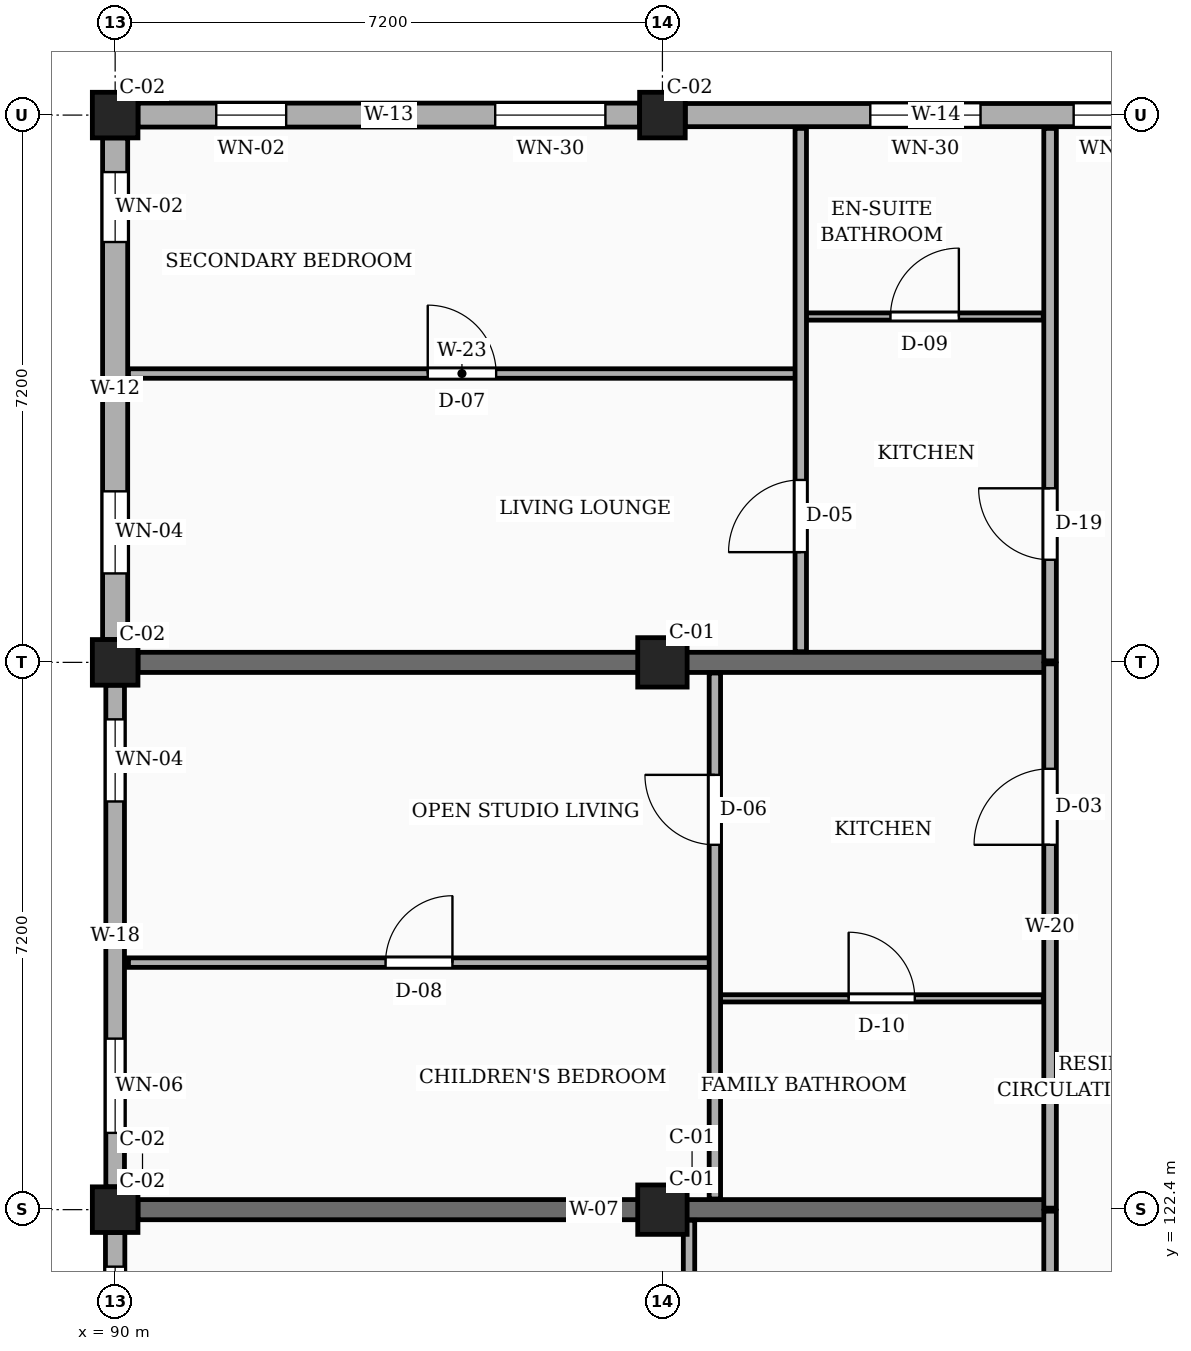
"""IFC4 building model, lengths in metres.
Left out: names, types, materials, properties, quantities, classifications, styles, units other than length and angle.
Written with IfcOpenShell. Run it as: python <this file> out.ifc"""

import sys

from ifc_helpers import new_model, si_unit, direction, frame, frame_2d, origin, origin_2d, place, context, subcontext, project, spatial, rectangle, extrude, element, fill, save


model = new_model("IFC4")
c1 = context("Model", 3, precision=1e-05, world=origin(), true_north=direction((0.0, 1.0)))
c2 = subcontext(c1, "Body", "Model", "MODEL_VIEW")
j1 = project(units=[si_unit("LENGTHUNIT", "METRE"), si_unit("PLANEANGLEUNIT", "RADIAN")], contexts=[c1])
p1 = place(None, origin())
s1 = spatial("IfcSite", under=j1, at=p1, CompositionType="ELEMENT")
p2 = place(p1, origin())
s2 = spatial("IfcBuilding", under=s1, at=p2, CompositionType="ELEMENT")
p3 = place(p2, frame((0.0, 0.0, 4.5)))
s3 = spatial("IfcBuildingStorey", under=s2, at=p3, CompositionType="ELEMENT", Elevation=4.5)
for number, where, z_axis, x_axis in (
    (1, (90.0, 122.4, 0.0), (0.0, 0.0, 1.0), (1.0, 0.0, 0.0)),
    (2, (90.0, 129.6, 0.0), (0.0, 0.0, 1.0), (1.0, 0.0, 0.0)),
    (3, (90.0, 136.8, 0.0), (0.0, 0.0, 1.0), (1.0, 0.0, 0.0)),
):
    element("IfcColumn", number, at=place(p3, frame(where, z_axis=z_axis, x_axis=x_axis)), inside=s3, PredefinedType="COLUMN", context=c2, shape_type="SweptSolid", body=[
        extrude(rectangle(XDim=0.6, YDim=0.6, at=origin_2d()), origin(), (0.0, 0.0, 1.0), 3.15),
    ])
for number, where, z_axis, x_axis in (
    (4, (97.2, 122.4, 0.0), (0.0, 0.0, 1.0), (1.0, 0.0, 0.0)),
    (5, (97.2, 129.6, 0.0), (0.0, 0.0, 1.0), (1.0, 0.0, 0.0)),
):
    element("IfcColumn", number, at=place(p3, frame(where, z_axis=z_axis, x_axis=x_axis)), inside=s3, PredefinedType="COLUMN", context=c2, shape_type="SweptSolid", body=[
        extrude(rectangle(XDim=0.65, YDim=0.65, at=origin_2d()), origin(), (0.0, 0.0, 1.0), 3.15),
    ])
p4 = place(p3, frame((97.2, 136.8, 0.0), z_axis=(0.0, 0.0, 1.0), x_axis=(1.0, 0.0, 0.0)))
e6 = element("IfcColumn", 6, at=p4, inside=s3, PredefinedType="COLUMN", context=c2, shape_type="SweptSolid", body=[
    extrude(rectangle(XDim=0.6, YDim=0.6, at=origin_2d()), origin(), (0.0, 0.0, 1.0), 3.15),
])
for number, where, z_axis, x_axis in (
    (7, (90.3, 122.4, 0.0), (0.0, 0.0, 1.0), (1.0, 0.0, 0.0)),
    (8, (90.3, 129.6, 0.0), (0.0, 0.0, 1.0), (1.0, 0.0, 0.0)),
):
    element("IfcWall", number, at=place(p3, frame(where, z_axis=z_axis, x_axis=x_axis)), inside=s3, PredefinedType="SOLIDWALL", context=c2, shape_type="SweptSolid", body=[
        extrude(rectangle(XDim=12.0, YDim=0.265, at=frame_2d((6.0, 0.0))), origin(), (0.0, 0.0, 1.0), 2.19),
    ])
p5 = place(p3, frame((104.1, 136.8, 0.0), z_axis=(0.0, 0.0, 1.0), x_axis=(-1.0, 0.0, 0.0)))
e9 = element("IfcWall", 9, at=p5, inside=s3, PredefinedType="SOLIDWALL", context=c2, shape_type="SweptSolid", body=[
    extrude(rectangle(XDim=6.6, YDim=0.305, at=frame_2d((3.3, 0.0))), origin(), (0.0, 0.0, 1.0), 2.46),
])
p6 = place(p5, frame((0.45, 0.0, 0.78)))
e10 = element("IfcOpeningElement", 10, at=p6, cuts=e9, PredefinedType="OPENING", context=c2, shape_type="SweptSolid", body=[
    extrude(rectangle(XDim=1.04, YDim=1.26, at=frame_2d((0.52, 0.63))), frame((0.0, 0.163, 0.0), z_axis=(0.0, -1.0, 0.0), x_axis=(1.0, 0.0, 0.0)), (0.0, 0.0, 1.0), 0.325),
])
p7 = place(p5, frame((2.715, 0.0, 0.78)))
e11 = element("IfcOpeningElement", 11, at=p7, cuts=e9, PredefinedType="OPENING", context=c2, shape_type="SweptSolid", body=[
    extrude(rectangle(XDim=1.45, YDim=1.44, at=frame_2d((0.725, 0.72))), frame((0.0, 0.163, 0.0), z_axis=(0.0, -1.0, 0.0), x_axis=(1.0, 0.0, 0.0)), (0.0, 0.0, 1.0), 0.325),
])
p8 = place(p3, frame((96.9, 136.8, 0.0), z_axis=(0.0, 0.0, 1.0), x_axis=(-1.0, 0.0, 0.0)))
e12 = element("IfcWall", 12, at=p8, inside=s3, PredefinedType="SOLIDWALL", context=c2, shape_type="SweptSolid", body=[
    extrude(rectangle(XDim=6.6, YDim=0.315, at=frame_2d((3.3, 0.0))), origin(), (0.0, 0.0, 1.0), 2.46),
])
p9 = place(p8, frame((0.45, 0.0, 0.78)))
e13 = element("IfcOpeningElement", 13, at=p9, cuts=e12, PredefinedType="OPENING", context=c2, shape_type="SweptSolid", body=[
    extrude(rectangle(XDim=1.45, YDim=1.44, at=frame_2d((0.725, 0.72))), frame((0.0, 0.167, 0.0), z_axis=(0.0, -1.0, 0.0), x_axis=(1.0, 0.0, 0.0)), (0.0, 0.0, 1.0), 0.335),
])
p10 = place(p8, frame((4.65, 0.0, 0.78)))
e14 = element("IfcOpeningElement", 14, at=p10, cuts=e12, PredefinedType="OPENING", context=c2, shape_type="SweptSolid", body=[
    extrude(rectangle(XDim=0.92, YDim=1.15, at=frame_2d((0.46, 0.575))), frame((0.0, 0.167, 0.0), z_axis=(0.0, -1.0, 0.0), x_axis=(1.0, 0.0, 0.0)), (0.0, 0.0, 1.0), 0.335),
])
p11 = place(p3, frame((90.0, 136.5, 0.0), z_axis=(0.0, 0.0, 1.0), x_axis=(0.0, -1.0, 0.0)))
e15 = element("IfcWall", 15, at=p11, inside=s3, PredefinedType="SOLIDWALL", context=c2, shape_type="SweptSolid", body=[
    extrude(rectangle(XDim=6.6, YDim=0.33, at=frame_2d((3.3, 0.0))), origin(), (0.0, 0.0, 1.0), 2.46),
])
p12 = place(p11, frame((0.45, 0.0, 0.78)))
e16 = element("IfcOpeningElement", 16, at=p12, cuts=e15, PredefinedType="OPENING", context=c2, shape_type="SweptSolid", body=[
    extrude(rectangle(XDim=0.92, YDim=1.15, at=frame_2d((0.46, 0.575))), frame((0.0, 0.175, 0.0), z_axis=(0.0, -1.0, 0.0), x_axis=(1.0, 0.0, 0.0)), (0.0, 0.0, 1.0), 0.35),
])
p13 = place(p11, frame((4.65, 0.0, 0.78)))
e17 = element("IfcOpeningElement", 17, at=p13, cuts=e15, PredefinedType="OPENING", context=c2, shape_type="SweptSolid", body=[
    extrude(rectangle(XDim=1.08, YDim=1.15, at=frame_2d((0.54, 0.575))), frame((0.0, 0.175, 0.0), z_axis=(0.0, -1.0, 0.0), x_axis=(1.0, 0.0, 0.0)), (0.0, 0.0, 1.0), 0.35),
])
p14 = place(p3, frame((90.0, 129.3, 0.0), z_axis=(0.0, 0.0, 1.0), x_axis=(0.0, -1.0, 0.0)))
e18 = element("IfcWall", 18, at=p14, inside=s3, PredefinedType="SOLIDWALL", context=c2, shape_type="SweptSolid", body=[
    extrude(rectangle(XDim=6.6, YDim=0.245, at=frame_2d((3.3, 0.0))), origin(), (0.0, 0.0, 1.0), 2.46),
])
p15 = place(p14, frame((0.45, 0.0, 0.78)))
e19 = element("IfcOpeningElement", 19, at=p15, cuts=e18, PredefinedType="OPENING", context=c2, shape_type="SweptSolid", body=[
    extrude(rectangle(XDim=1.08, YDim=1.15, at=frame_2d((0.54, 0.575))), frame((0.0, 0.133, 0.0), z_axis=(0.0, -1.0, 0.0), x_axis=(1.0, 0.0, 0.0)), (0.0, 0.0, 1.0), 0.265),
])
p16 = place(p14, frame((4.65, 0.0, 0.78)))
e20 = element("IfcOpeningElement", 20, at=p16, cuts=e18, PredefinedType="OPENING", context=c2, shape_type="SweptSolid", body=[
    extrude(rectangle(XDim=1.24, YDim=1.15, at=frame_2d((0.62, 0.575))), frame((0.0, 0.133, 0.0), z_axis=(0.0, -1.0, 0.0), x_axis=(1.0, 0.0, 0.0)), (0.0, 0.0, 1.0), 0.265),
])
p17 = place(p3, frame((90.0, 122.1, 0.0), z_axis=(0.0, 0.0, 1.0), x_axis=(0.0, -1.0, 0.0)))
e21 = element("IfcWall", 21, at=p17, inside=s3, PredefinedType="SOLIDWALL", context=c2, shape_type="SweptSolid", body=[
    extrude(rectangle(XDim=6.6, YDim=0.255, at=frame_2d((3.3, 0.0))), origin(), (0.0, 0.0, 1.0), 2.46),
])
p18 = place(p17, frame((0.45, 0.0, 0.78)))
e22 = element("IfcOpeningElement", 22, at=p18, cuts=e21, PredefinedType="OPENING", context=c2, shape_type="SweptSolid", body=[
    extrude(rectangle(XDim=1.24, YDim=1.15, at=frame_2d((0.62, 0.575))), frame((0.0, 0.137, 0.0), z_axis=(0.0, -1.0, 0.0), x_axis=(1.0, 0.0, 0.0)), (0.0, 0.0, 1.0), 0.275),
])
p19 = place(p17, frame((4.65, 0.0, 0.78)))
e23 = element("IfcOpeningElement", 23, at=p19, cuts=e21, PredefinedType="OPENING", context=c2, shape_type="SweptSolid", body=[
    extrude(rectangle(XDim=1.4, YDim=1.15, at=frame_2d((0.7, 0.575))), frame((0.0, 0.137, 0.0), z_axis=(0.0, -1.0, 0.0), x_axis=(1.0, 0.0, 0.0)), (0.0, 0.0, 1.0), 0.275),
])
p20 = place(p3, frame((102.3, 115.22, 0.0), z_axis=(0.0, 0.0, 1.0), x_axis=(0.0, 1.0, 0.0)))
e24 = element("IfcWall", 24, at=p20, inside=s3, PredefinedType="PARTITIONING", context=c2, shape_type="SweptSolid", body=[
    extrude(rectangle(XDim=7.16, YDim=0.165, at=frame_2d((3.58, 0.0))), origin(), (0.0, 0.0, 1.0), 2.325),
])
p21 = place(p20, frame((4.78, 0.0, 0.0)))
e25 = element("IfcOpeningElement", 25, at=p21, cuts=e24, PredefinedType="OPENING", context=c2, shape_type="SweptSolid", body=[
    extrude(rectangle(XDim=1.14, YDim=2.18, at=frame_2d((0.57, 1.09))), frame((0.0, 0.093, 0.0), z_axis=(0.0, -1.0, 0.0), x_axis=(1.0, 0.0, 0.0)), (0.0, 0.0, 1.0), 0.185),
])
p22 = place(p3, frame((102.3, 122.42, 0.0), z_axis=(0.0, 0.0, 1.0), x_axis=(0.0, 1.0, 0.0)))
e26 = element("IfcWall", 26, at=p22, inside=s3, PredefinedType="PARTITIONING", context=c2, shape_type="SweptSolid", body=[
    extrude(rectangle(XDim=7.16, YDim=0.165, at=frame_2d((3.58, 0.0))), origin(), (0.0, 0.0, 1.0), 2.325),
])
p23 = place(p22, frame((4.78, 0.0, 0.0)))
e27 = element("IfcOpeningElement", 27, at=p23, cuts=e26, PredefinedType="OPENING", context=c2, shape_type="SweptSolid", body=[
    extrude(rectangle(XDim=1.0, YDim=2.15, at=frame_2d((0.5, 1.075))), frame((0.0, 0.093, 0.0), z_axis=(0.0, -1.0, 0.0), x_axis=(1.0, 0.0, 0.0)), (0.0, 0.0, 1.0), 0.185),
])
p24 = place(p3, frame((102.3, 129.62, 0.0), z_axis=(0.0, 0.0, 1.0), x_axis=(0.0, 1.0, 0.0)))
e28 = element("IfcWall", 28, at=p24, inside=s3, PredefinedType="PARTITIONING", context=c2, shape_type="SweptSolid", body=[
    extrude(rectangle(XDim=7.005, YDim=0.165, at=frame_2d((3.502, 0.0))), origin(), (0.0, 0.0, 1.0), 2.325),
])
p25 = place(p24, frame((1.33, 0.0, 0.0)))
e29 = element("IfcOpeningElement", 29, at=p25, cuts=e28, PredefinedType="OPENING", context=c2, shape_type="SweptSolid", body=[
    extrude(rectangle(XDim=0.94, YDim=2.12, at=frame_2d((0.47, 1.06))), frame((0.0, 0.093, 0.0), z_axis=(0.0, -1.0, 0.0), x_axis=(1.0, 0.0, 0.0)), (0.0, 0.0, 1.0), 0.185),
])
p26 = place(p3, frame((97.55, 115.34, 0.0), z_axis=(0.0, 0.0, 1.0), x_axis=(0.0, 1.0, 0.0)))
e30 = element("IfcWall", 30, at=p26, inside=s3, PredefinedType="PARTITIONING", context=c2, shape_type="SweptSolid", body=[
    extrude(rectangle(XDim=6.92, YDim=0.15, at=frame_2d((3.46, 0.0))), origin(), (0.0, 0.0, 1.0), 2.325),
])
p27 = place(p26, frame((4.66, 0.0, 0.0)))
e31 = element("IfcOpeningElement", 31, at=p27, cuts=e30, PredefinedType="OPENING", context=c2, shape_type="SweptSolid", body=[
    extrude(rectangle(XDim=0.95, YDim=2.1, at=frame_2d((0.475, 1.05))), frame((0.0, 0.085, 0.0), z_axis=(0.0, -1.0, 0.0), x_axis=(1.0, 0.0, 0.0)), (0.0, 0.0, 1.0), 0.17),
])
p28 = place(p3, frame((90.175, 125.65, 0.0), z_axis=(0.0, 0.0, 1.0), x_axis=(1.0, 0.0, 0.0)))
e32 = element("IfcWall", 32, at=p28, inside=s3, PredefinedType="PARTITIONING", context=c2, shape_type="SweptSolid", body=[
    extrude(rectangle(XDim=7.645, YDim=0.125, at=frame_2d((3.823, 0.0))), origin(), (0.0, 0.0, 1.0), 2.325),
])
p29 = place(p28, frame((3.383, 0.0, 0.0)))
e33 = element("IfcOpeningElement", 33, at=p29, cuts=e32, PredefinedType="OPENING", context=c2, shape_type="SweptSolid", body=[
    extrude(rectangle(XDim=0.88, YDim=2.08, at=frame_2d((0.44, 1.04))), frame((0.0, 0.073, 0.0), z_axis=(0.0, -1.0, 0.0), x_axis=(1.0, 0.0, 0.0)), (0.0, 0.0, 1.0), 0.145),
])
p30 = place(p3, frame((97.96, 125.18, 0.0), z_axis=(0.0, 0.0, 1.0), x_axis=(1.0, 0.0, 0.0)))
e34 = element("IfcWall", 34, at=p30, inside=s3, PredefinedType="PARTITIONING", context=c2, shape_type="SweptSolid", body=[
    extrude(rectangle(XDim=4.25, YDim=0.095, at=frame_2d((2.125, 0.0))), origin(), (0.0, 0.0, 1.0), 2.325),
])
p31 = place(p30, frame((1.69, 0.0, 0.0)))
e35 = element("IfcOpeningElement", 35, at=p31, cuts=e34, PredefinedType="OPENING", context=c2, shape_type="SweptSolid", body=[
    extrude(rectangle(XDim=0.87, YDim=2.05, at=frame_2d((0.435, 1.025))), frame((0.0, 0.058, 0.0), z_axis=(0.0, -1.0, 0.0), x_axis=(1.0, 0.0, 0.0)), (0.0, 0.0, 1.0), 0.115),
])
p32 = place(p3, frame((97.89, 122.54, 0.0), z_axis=(0.0, 0.0, 1.0), x_axis=(0.0, 1.0, 0.0)))
e36 = element("IfcWall", 36, at=p32, inside=s3, PredefinedType="PARTITIONING", context=c2, shape_type="SweptSolid", body=[
    extrude(rectangle(XDim=6.92, YDim=0.15, at=frame_2d((3.46, 0.0))), origin(), (0.0, 0.0, 1.0), 2.325),
])
p33 = place(p32, frame((4.66, 0.0, 0.0)))
e37 = element("IfcOpeningElement", 37, at=p33, cuts=e36, PredefinedType="OPENING", context=c2, shape_type="SweptSolid", body=[
    extrude(rectangle(XDim=0.92, YDim=2.1, at=frame_2d((0.46, 1.05))), frame((0.0, 0.085, 0.0), z_axis=(0.0, -1.0, 0.0), x_axis=(1.0, 0.0, 0.0)), (0.0, 0.0, 1.0), 0.17),
])
p34 = place(p3, frame((90.175, 133.4, 0.0), z_axis=(0.0, 0.0, 1.0), x_axis=(1.0, 0.0, 0.0)))
e38 = element("IfcWall", 38, at=p34, inside=s3, PredefinedType="PARTITIONING", context=c2, shape_type="SweptSolid", body=[
    extrude(rectangle(XDim=8.775, YDim=0.125, at=frame_2d((4.387, 0.0))), origin(), (0.0, 0.0, 1.0), 2.325),
])
p35 = place(p34, frame((3.938, 0.0, 0.0)))
e39 = element("IfcOpeningElement", 39, at=p35, cuts=e38, PredefinedType="OPENING", context=c2, shape_type="SweptSolid", body=[
    extrude(rectangle(XDim=0.9, YDim=2.1, at=frame_2d((0.45, 1.05))), frame((0.0, 0.073, 0.0), z_axis=(0.0, -1.0, 0.0), x_axis=(1.0, 0.0, 0.0)), (0.0, 0.0, 1.0), 0.145),
])
p36 = place(p3, frame((99.09, 134.15, 0.0), z_axis=(0.0, 0.0, 1.0), x_axis=(1.0, 0.0, 0.0)))
e40 = element("IfcWall", 40, at=p36, inside=s3, PredefinedType="PARTITIONING", context=c2, shape_type="SweptSolid", body=[
    extrude(rectangle(XDim=3.12, YDim=0.095, at=frame_2d((1.56, 0.0))), origin(), (0.0, 0.0, 1.0), 2.325),
])
p37 = place(p36, frame((1.11, 0.0, 0.0)))
e41 = element("IfcOpeningElement", 41, at=p37, cuts=e40, PredefinedType="OPENING", context=c2, shape_type="SweptSolid", body=[
    extrude(rectangle(XDim=0.9, YDim=2.05, at=frame_2d((0.45, 1.025))), frame((0.0, 0.058, 0.0), z_axis=(0.0, -1.0, 0.0), x_axis=(1.0, 0.0, 0.0)), (0.0, 0.0, 1.0), 0.115),
])
p38 = place(p3, frame((99.02, 129.74, 0.0), z_axis=(0.0, 0.0, 1.0), x_axis=(0.0, 1.0, 0.0)))
e42 = element("IfcWall", 42, at=p38, inside=s3, PredefinedType="PARTITIONING", context=c2, shape_type="SweptSolid", body=[
    extrude(rectangle(XDim=6.885, YDim=0.15, at=frame_2d((3.442, 0.0))), origin(), (0.0, 0.0, 1.0), 2.325),
])
p39 = place(p38, frame((1.31, 0.0, 0.0)))
e43 = element("IfcOpeningElement", 43, at=p39, cuts=e42, PredefinedType="OPENING", context=c2, shape_type="SweptSolid", body=[
    extrude(rectangle(XDim=0.95, YDim=2.1, at=frame_2d((0.475, 1.05))), frame((0.0, 0.085, 0.0), z_axis=(0.0, -1.0, 0.0), x_axis=(1.0, 0.0, 0.0)), (0.0, 0.0, 1.0), 0.17),
])
p40 = place(p6, origin())
e44 = element("IfcWindow", 44, at=p40, inside=s3, PartitioningType="SINGLE_PANEL", PredefinedType="WINDOW", context=c2, shape_type="SweptSolid", body=[
    extrude(rectangle(XDim=1.04, YDim=1.26, at=frame_2d((0.52, 0.63))), frame((0.0, 0.03, 0.0), z_axis=(0.0, -1.0, 0.0), x_axis=(1.0, 0.0, 0.0)), (0.0, 0.0, 1.0), 0.06),
])
fill(e10, e44)
p41 = place(p7, origin())
e45 = element("IfcWindow", 45, at=p41, inside=s3, PartitioningType="SINGLE_PANEL", PredefinedType="WINDOW", context=c2, shape_type="SweptSolid", body=[
    extrude(rectangle(XDim=1.45, YDim=1.44, at=frame_2d((0.725, 0.72))), frame((0.0, 0.03, 0.0), z_axis=(0.0, -1.0, 0.0), x_axis=(1.0, 0.0, 0.0)), (0.0, 0.0, 1.0), 0.06),
])
fill(e11, e45)
p42 = place(p9, origin())
e46 = element("IfcWindow", 46, at=p42, inside=s3, PartitioningType="SINGLE_PANEL", PredefinedType="WINDOW", context=c2, shape_type="SweptSolid", body=[
    extrude(rectangle(XDim=1.45, YDim=1.44, at=frame_2d((0.725, 0.72))), frame((0.0, 0.03, 0.0), z_axis=(0.0, -1.0, 0.0), x_axis=(1.0, 0.0, 0.0)), (0.0, 0.0, 1.0), 0.06),
])
fill(e13, e46)
p43 = place(p10, origin())
e47 = element("IfcWindow", 47, at=p43, inside=s3, PartitioningType="SINGLE_PANEL", PredefinedType="WINDOW", context=c2, shape_type="SweptSolid", body=[
    extrude(rectangle(XDim=0.92, YDim=1.15, at=frame_2d((0.46, 0.575))), frame((0.0, 0.03, 0.0), z_axis=(0.0, -1.0, 0.0), x_axis=(1.0, 0.0, 0.0)), (0.0, 0.0, 1.0), 0.06),
])
fill(e14, e47)
p44 = place(p12, origin())
e48 = element("IfcWindow", 48, at=p44, inside=s3, PartitioningType="SINGLE_PANEL", PredefinedType="WINDOW", context=c2, shape_type="SweptSolid", body=[
    extrude(rectangle(XDim=0.92, YDim=1.15, at=frame_2d((0.46, 0.575))), frame((0.0, 0.03, 0.0), z_axis=(0.0, -1.0, 0.0), x_axis=(1.0, 0.0, 0.0)), (0.0, 0.0, 1.0), 0.06),
])
fill(e16, e48)
p45 = place(p13, origin())
e49 = element("IfcWindow", 49, at=p45, inside=s3, PartitioningType="SINGLE_PANEL", PredefinedType="WINDOW", context=c2, shape_type="SweptSolid", body=[
    extrude(rectangle(XDim=1.08, YDim=1.15, at=frame_2d((0.54, 0.575))), frame((0.0, 0.03, 0.0), z_axis=(0.0, -1.0, 0.0), x_axis=(1.0, 0.0, 0.0)), (0.0, 0.0, 1.0), 0.06),
])
fill(e17, e49)
p46 = place(p15, origin())
e50 = element("IfcWindow", 50, at=p46, inside=s3, PartitioningType="SINGLE_PANEL", PredefinedType="WINDOW", context=c2, shape_type="SweptSolid", body=[
    extrude(rectangle(XDim=1.08, YDim=1.15, at=frame_2d((0.54, 0.575))), frame((0.0, 0.03, 0.0), z_axis=(0.0, -1.0, 0.0), x_axis=(1.0, 0.0, 0.0)), (0.0, 0.0, 1.0), 0.06),
])
fill(e19, e50)
p47 = place(p16, origin())
e51 = element("IfcWindow", 51, at=p47, inside=s3, PartitioningType="SINGLE_PANEL", PredefinedType="WINDOW", context=c2, shape_type="SweptSolid", body=[
    extrude(rectangle(XDim=1.24, YDim=1.15, at=frame_2d((0.62, 0.575))), frame((0.0, 0.03, 0.0), z_axis=(0.0, -1.0, 0.0), x_axis=(1.0, 0.0, 0.0)), (0.0, 0.0, 1.0), 0.06),
])
fill(e20, e51)
p48 = place(p18, origin())
e52 = element("IfcWindow", 52, at=p48, inside=s3, PartitioningType="SINGLE_PANEL", PredefinedType="WINDOW", context=c2, shape_type="SweptSolid", body=[
    extrude(rectangle(XDim=1.24, YDim=1.15, at=frame_2d((0.62, 0.575))), frame((0.0, 0.03, 0.0), z_axis=(0.0, -1.0, 0.0), x_axis=(1.0, 0.0, 0.0)), (0.0, 0.0, 1.0), 0.06),
])
fill(e22, e52)
p49 = place(p23, origin())
e53 = element("IfcDoor", 53, at=p49, inside=s3, OperationType="SINGLE_SWING_LEFT", PredefinedType="DOOR", context=c2, shape_type="SweptSolid", body=[
    extrude(rectangle(XDim=1.0, YDim=2.15, at=frame_2d((0.5, 1.075))), frame((0.0, 0.025, 0.0), z_axis=(0.0, -1.0, 0.0), x_axis=(1.0, 0.0, 0.0)), (0.0, 0.0, 1.0), 0.05),
])
fill(e27, e53)
p50 = place(p25, origin())
e54 = element("IfcDoor", 54, at=p50, inside=s3, OperationType="SINGLE_SWING_RIGHT", PredefinedType="DOOR", context=c2, shape_type="SweptSolid", body=[
    extrude(rectangle(XDim=0.94, YDim=2.12, at=frame_2d((0.47, 1.06))), frame((0.0, 0.025, 0.0), z_axis=(0.0, -1.0, 0.0), x_axis=(1.0, 0.0, 0.0)), (0.0, 0.0, 1.0), 0.05),
])
fill(e29, e54)
p51 = place(p29, origin())
e55 = element("IfcDoor", 55, at=p51, inside=s3, OperationType="SINGLE_SWING_RIGHT", PredefinedType="DOOR", context=c2, shape_type="SweptSolid", body=[
    extrude(rectangle(XDim=0.88, YDim=2.08, at=frame_2d((0.44, 1.04))), frame((0.0, 0.025, 0.0), z_axis=(0.0, -1.0, 0.0), x_axis=(1.0, 0.0, 0.0)), (0.0, 0.0, 1.0), 0.05),
])
fill(e33, e55)
p52 = place(p31, origin())
e56 = element("IfcDoor", 56, at=p52, inside=s3, OperationType="SINGLE_SWING_LEFT", PredefinedType="DOOR", context=c2, shape_type="SweptSolid", body=[
    extrude(rectangle(XDim=0.87, YDim=2.05, at=frame_2d((0.435, 1.025))), frame((0.0, 0.025, 0.0), z_axis=(0.0, -1.0, 0.0), x_axis=(1.0, 0.0, 0.0)), (0.0, 0.0, 1.0), 0.05),
])
fill(e35, e56)
p53 = place(p33, origin())
e57 = element("IfcDoor", 57, at=p53, inside=s3, OperationType="SINGLE_SWING_RIGHT", PredefinedType="DOOR", context=c2, shape_type="SweptSolid", body=[
    extrude(rectangle(XDim=0.92, YDim=2.1, at=frame_2d((0.46, 1.05))), frame((0.0, 0.025, 0.0), z_axis=(0.0, -1.0, 0.0), x_axis=(1.0, 0.0, 0.0)), (0.0, 0.0, 1.0), 0.05),
])
fill(e37, e57)
p54 = place(p35, origin())
e58 = element("IfcDoor", 58, at=p54, inside=s3, OperationType="SINGLE_SWING_LEFT", PredefinedType="DOOR", context=c2, shape_type="SweptSolid", body=[
    extrude(rectangle(XDim=0.9, YDim=2.1, at=frame_2d((0.45, 1.05))), frame((0.0, 0.025, 0.0), z_axis=(0.0, -1.0, 0.0), x_axis=(1.0, 0.0, 0.0)), (0.0, 0.0, 1.0), 0.05),
])
fill(e39, e58)
p55 = place(p37, origin())
e59 = element("IfcDoor", 59, at=p55, inside=s3, OperationType="SINGLE_SWING_RIGHT", PredefinedType="DOOR", context=c2, shape_type="SweptSolid", body=[
    extrude(rectangle(XDim=0.9, YDim=2.05, at=frame_2d((0.45, 1.025))), frame((0.0, 0.025, 0.0), z_axis=(0.0, -1.0, 0.0), x_axis=(1.0, 0.0, 0.0)), (0.0, 0.0, 1.0), 0.05),
])
fill(e41, e59)
p56 = place(p39, origin())
e60 = element("IfcDoor", 60, at=p56, inside=s3, OperationType="SINGLE_SWING_LEFT", PredefinedType="DOOR", context=c2, shape_type="SweptSolid", body=[
    extrude(rectangle(XDim=0.95, YDim=2.1, at=frame_2d((0.475, 1.05))), frame((0.0, 0.025, 0.0), z_axis=(0.0, -1.0, 0.0), x_axis=(1.0, 0.0, 0.0)), (0.0, 0.0, 1.0), 0.05),
])
fill(e43, e60)
save(model, sys.argv[1])
